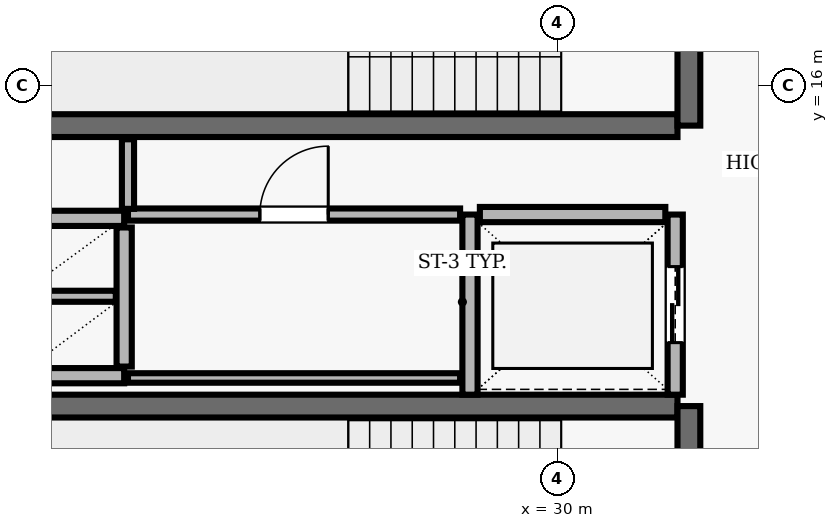
"""IFC4 building model, lengths in metres.
Left out: names, types, materials, properties, quantities, classifications, styles, units other than length and angle.
Written with IfcOpenShell. Run it as: python <this file> out.ifc"""

import sys

from ifc_helpers import new_model, si_unit, direction, frame, frame_2d, origin, place, context, subcontext, project, spatial, rectangle, extrude, element, fill, save


model = new_model("IFC4")
c1 = context("Model", 3, precision=1e-05, world=origin(), true_north=direction((0.0, 1.0)))
c2 = subcontext(c1, "Body", "Model", "MODEL_VIEW")
j1 = project(units=[si_unit("LENGTHUNIT", "METRE"), si_unit("PLANEANGLEUNIT", "RADIAN")], contexts=[c1])
p1 = place(None, origin())
s1 = spatial("IfcSite", under=j1, at=p1, CompositionType="ELEMENT")
p2 = place(p1, origin())
s2 = spatial("IfcBuilding", under=s1, at=p2, CompositionType="ELEMENT")
p3 = place(p2, frame((0.0, 0.0, 183.6)))
s3 = spatial("IfcBuildingStorey", under=s2, at=p3, CompositionType="ELEMENT", Elevation=183.6)
p4 = place(p3, frame((23.22, 15.47, 0.0), z_axis=(0.0, 0.0, 1.0), x_axis=(1.0, 0.0, 0.0)))
e1 = element("IfcWall", 1, at=p4, inside=s3, PredefinedType="SHEAR", context=c2, shape_type="SweptSolid", body=[
    extrude(rectangle(XDim=8.36, YDim=0.3, at=frame_2d((4.18, 0.0))), origin(), (0.0, 0.0, 1.0), 3.69),
])
p5 = place(p3, frame((31.73, 15.47, 0.0), z_axis=(0.0, 0.0, 1.0), x_axis=(0.0, 1.0, 0.0)))
e2 = element("IfcWall", 2, at=p5, inside=s3, PredefinedType="SHEAR", context=c2, shape_type="SweptSolid", body=[
    extrude(rectangle(XDim=3.51, YDim=0.3, at=frame_2d((1.755, 0.0))), origin(), (0.0, 0.0, 1.0), 3.69),
])
p6 = place(p5, frame((1.18, 0.0, 0.0)))
e3 = element("IfcOpeningElement", 3, at=p6, cuts=e2, PredefinedType="OPENING", context=c2, shape_type="SweptSolid", body=[
    extrude(rectangle(XDim=1.15, YDim=2.15, at=frame_2d((0.575, 1.075))), frame((0.0, 0.16, 0.0), z_axis=(0.0, -1.0, 0.0), x_axis=(1.0, 0.0, 0.0)), (0.0, 0.0, 1.0), 0.32),
])
p7 = place(p3, frame((31.58, 11.78, 0.0), z_axis=(0.0, 0.0, 1.0), x_axis=(-1.0, 0.0, 0.0)))
e4 = element("IfcWall", 4, at=p7, inside=s3, PredefinedType="SHEAR", context=c2, shape_type="SweptSolid", body=[
    extrude(rectangle(XDim=8.36, YDim=0.3, at=frame_2d((4.18, 0.0))), origin(), (0.0, 0.0, 1.0), 3.69),
])
p8 = place(p3, frame((31.73, 8.27, 0.0), z_axis=(0.0, 0.0, 1.0), x_axis=(0.0, 1.0, 0.0)))
e5 = element("IfcWall", 5, at=p8, inside=s3, PredefinedType="SHEAR", context=c2, shape_type="SweptSolid", body=[
    extrude(rectangle(XDim=3.51, YDim=0.3, at=frame_2d((1.755, 0.0))), origin(), (0.0, 0.0, 1.0), 3.69),
])
p9 = place(p8, frame((1.18, 0.0, 0.0)))
e6 = element("IfcOpeningElement", 6, at=p9, cuts=e5, PredefinedType="OPENING", context=c2, shape_type="SweptSolid", body=[
    extrude(rectangle(XDim=1.15, YDim=2.15, at=frame_2d((0.575, 1.075))), frame((0.0, 0.16, 0.0), z_axis=(0.0, -1.0, 0.0), x_axis=(1.0, 0.0, 0.0)), (0.0, 0.0, 1.0), 0.32),
])
p10 = place(p3, frame((28.85, 14.3, 0.0), z_axis=(0.0, 0.0, 1.0), x_axis=(0.0, -1.0, 0.0)))
e7 = element("IfcWall", 7, at=p10, inside=s3, PredefinedType="SOLIDWALL", context=c2, shape_type="SweptSolid", body=[
    extrude(rectangle(XDim=2.37, YDim=0.2, at=frame_2d((1.185, 0.0))), origin(), (0.0, 0.0, 1.0), 3.69),
])
p11 = place(p3, frame((31.55, 11.93, 0.0), z_axis=(0.0, 0.0, 1.0), x_axis=(0.0, 1.0, 0.0)))
e8 = element("IfcWall", 8, at=p11, inside=s3, PredefinedType="SOLIDWALL", context=c2, shape_type="SweptSolid", body=[
    extrude(rectangle(XDim=2.37, YDim=0.2, at=frame_2d((1.185, 0.0))), origin(), (0.0, 0.0, 1.0), 3.69),
])
p12 = place(p11, frame((0.685, 0.0, 0.0)))
e9 = element("IfcOpeningElement", 9, at=p12, cuts=e8, PredefinedType="OPENING", context=c2, shape_type="SweptSolid", body=[
    extrude(rectangle(XDim=1.0, YDim=2.1, at=frame_2d((0.5, 1.05))), frame((0.0, 0.11, 0.0), z_axis=(0.0, -1.0, 0.0), x_axis=(1.0, 0.0, 0.0)), (0.0, 0.0, 1.0), 0.22),
])
p13 = place(p3, frame((31.42, 14.3, 0.0), z_axis=(0.0, 0.0, 1.0), x_axis=(-1.0, 0.0, 0.0)))
e10 = element("IfcWall", 10, at=p13, inside=s3, PredefinedType="SOLIDWALL", context=c2, shape_type="SweptSolid", body=[
    extrude(rectangle(XDim=2.44, YDim=0.2, at=frame_2d((1.22, 0.0))), origin(), (0.0, 0.0, 1.0), 3.69),
])
for number, where, z_axis, x_axis in (
    (11, (22.9, 14.25, 0.0), (0.0, 0.0, 1.0), (1.0, 0.0, 0.0)),
    (12, (22.9, 12.18, 0.0), (0.0, 0.0, 1.0), (1.0, 0.0, 0.0)),
):
    element("IfcWall", number, at=place(p3, frame(where, z_axis=z_axis, x_axis=x_axis)), inside=s3, PredefinedType="SOLIDWALL", context=c2, shape_type="SweptSolid", body=[
        extrude(rectangle(XDim=1.4, YDim=0.2, at=frame_2d((0.7, 0.0))), origin(), (0.0, 0.0, 1.0), 3.69),
    ])
p14 = place(p3, frame((24.3, 12.3, 0.0), z_axis=(0.0, 0.0, 1.0), x_axis=(0.0, 1.0, 0.0)))
e13 = element("IfcWall", 13, at=p14, inside=s3, PredefinedType="SOLIDWALL", context=c2, shape_type="SweptSolid", body=[
    extrude(rectangle(XDim=1.83, YDim=0.2, at=frame_2d((0.915, 0.0))), origin(), (0.0, 0.0, 1.0), 3.69),
])
p15 = place(p3, frame((23.01, 13.225, 0.0), z_axis=(0.0, 0.0, 1.0), x_axis=(1.0, 0.0, 0.0)))
e14 = element("IfcWall", 14, at=p15, inside=s3, PredefinedType="PARTITIONING", context=c2, shape_type="SweptSolid", body=[
    extrude(rectangle(XDim=1.18, YDim=0.145, at=frame_2d((0.59, 0.0))), origin(), (0.0, 0.0, 1.0), 3.69),
])
p16 = place(p3, frame((24.35, 12.15, 0.0), z_axis=(0.0, 0.0, 1.0), x_axis=(1.0, 0.0, 0.0)))
e15 = element("IfcWall", 15, at=p16, inside=s3, PredefinedType="PARTITIONING", context=c2, shape_type="SweptSolid", body=[
    extrude(rectangle(XDim=4.37, YDim=0.125, at=frame_2d((2.185, 0.0))), origin(), (0.0, 0.0, 1.0), 3.69),
])
p17 = place(p3, frame((24.35, 14.3, 0.0), z_axis=(0.0, 0.0, 1.0), x_axis=(1.0, 0.0, 0.0)))
e16 = element("IfcWall", 16, at=p17, inside=s3, PredefinedType="PARTITIONING", context=c2, shape_type="SweptSolid", body=[
    extrude(rectangle(XDim=4.37, YDim=0.16, at=frame_2d((2.185, 0.0))), origin(), (0.0, 0.0, 1.0), 3.69),
])
p18 = place(p17, frame((1.735, 0.0, 0.0)))
e17 = element("IfcOpeningElement", 17, at=p18, cuts=e16, PredefinedType="OPENING", context=c2, shape_type="SweptSolid", body=[
    extrude(rectangle(XDim=0.9, YDim=2.1, at=frame_2d((0.45, 1.05))), frame((0.0, 0.09, 0.0), z_axis=(0.0, -1.0, 0.0), x_axis=(1.0, 0.0, 0.0)), (0.0, 0.0, 1.0), 0.18),
])
p19 = place(p3, frame((24.35, 15.29, 0.0), z_axis=(0.0, 0.0, 1.0), x_axis=(0.0, -1.0, 0.0)))
e18 = element("IfcWall", 18, at=p19, inside=s3, PredefinedType="PARTITIONING", context=c2, shape_type="SweptSolid", body=[
    extrude(rectangle(XDim=0.915, YDim=0.16, at=frame_2d((0.458, 0.0))), origin(), (0.0, 0.0, 1.0), 3.69),
])
p20 = place(p12, origin())
e19 = element("IfcDoor", 19, at=p20, inside=s3, OperationType="DOUBLE_DOOR_SLIDING", PredefinedType="DOOR", context=c2, shape_type="SweptSolid", body=[
    extrude(rectangle(XDim=1.0, YDim=2.1, at=frame_2d((0.5, 1.05))), frame((0.0, 0.025, 0.0), z_axis=(0.0, -1.0, 0.0), x_axis=(1.0, 0.0, 0.0)), (0.0, 0.0, 1.0), 0.05),
])
fill(e9, e19)
p21 = place(p18, origin())
e20 = element("IfcDoor", 20, at=p21, inside=s3, OperationType="SINGLE_SWING_RIGHT", PredefinedType="DOOR", context=c2, shape_type="SweptSolid", body=[
    extrude(rectangle(XDim=0.9, YDim=2.1, at=frame_2d((0.45, 1.05))), frame((0.0, 0.025, 0.0), z_axis=(0.0, -1.0, 0.0), x_axis=(1.0, 0.0, 0.0)), (0.0, 0.0, 1.0), 0.05),
])
fill(e17, e20)
save(model, sys.argv[1])
